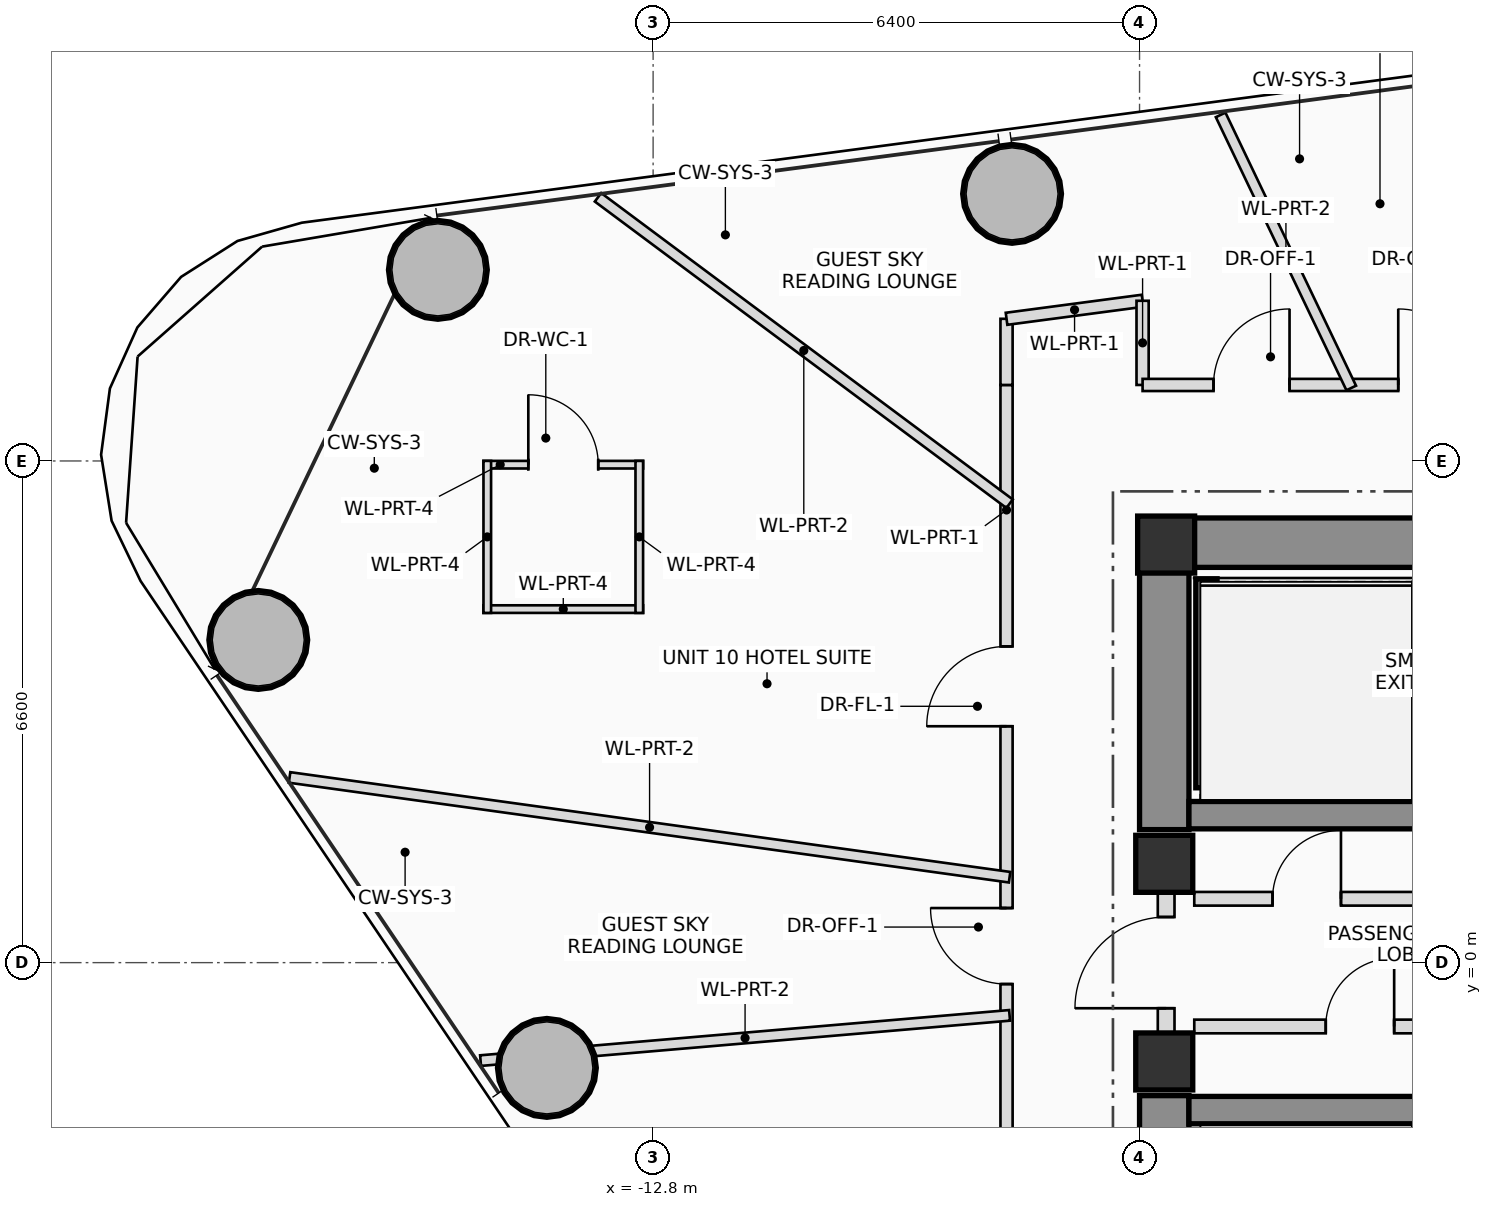
"""IFC4 building model, lengths in metres.
Left out: names, types, materials, properties, quantities, classifications, styles, units other than length and angle.
Written with IfcOpenShell. Run it as: python <this file> out.ifc"""

import sys

from ifc_helpers import new_model, si_unit, direction, frame, frame_2d, origin, origin_2d, place, context, subcontext, project, spatial, rectangle, hollow_circle, extrude, source, transform, mapped, element, fill, save


model = new_model("IFC4")
c1 = context("Model", 3, precision=1e-05, world=origin(), true_north=direction((0.0, 1.0)))
c2 = subcontext(c1, "Body", "Model", "MODEL_VIEW")
j1 = project(units=[si_unit("LENGTHUNIT", "METRE"), si_unit("PLANEANGLEUNIT", "RADIAN")], contexts=[c1])
p1 = place(None, origin())
s1 = spatial("IfcSite", under=j1, at=p1, CompositionType="ELEMENT")
p2 = place(p1, origin())
s2 = spatial("IfcBuilding", under=s1, at=p2, CompositionType="ELEMENT")
p3 = place(p2, frame((0.0, 0.0, 182.9)))
s3 = spatial("IfcBuildingStorey", under=s2, at=p3, CompositionType="ELEMENT", Elevation=182.9)
m1 = source(origin(), c2, "Body", "SweptSolid", [
    extrude(rectangle(XDim=0.75, YDim=0.75, at=origin_2d()), origin(), (0.0, 0.0, 1.0), 3.45),
])
p4 = place(p3, frame((-6.05, 5.5, 0.0), z_axis=(0.0, 0.0, 1.0), x_axis=(1.0, 0.0, 0.0)))
e1 = element("IfcColumn", 1, at=p4, inside=s3, PredefinedType="COLUMN", context=c2, shape_type="MappedRepresentation", body=[
    mapped(m1, transform((0.0, 0.0, 0.0), scale=1.0)),
])
p5 = place(p3, frame((-6.4, 5.525, 0.0), z_axis=(0.0, 0.0, 1.0), x_axis=(1.0, 0.0, 0.0)))
e2 = element("IfcWall", 2, at=p5, inside=s3, PredefinedType="SHEAR", context=c2, shape_type="SweptSolid", body=[
    extrude(rectangle(XDim=12.8, YDim=0.65, at=frame_2d((6.4, 0.0))), origin(), (0.0, 0.0, 1.0), 3.45),
])
p6 = place(p5, frame((8.6, 0.0, 0.0)))
e3 = element("IfcOpeningElement", 3, at=p6, cuts=e2, PredefinedType="OPENING", context=c2, shape_type="SweptSolid", body=[
    extrude(rectangle(XDim=1.2, YDim=2.2, at=frame_2d((0.6, 1.1))), frame((0.0, 0.335, 0.0), z_axis=(0.0, -1.0, 0.0), x_axis=(1.0, 0.0, 0.0)), (0.0, 0.0, 1.0), 0.67),
])
for number, where, z_axis, x_axis in (
    (4, (-6.075, -5.2, 0.0), (0.0, 0.0, 1.0), (0.0, 1.0, 0.0)),
    (5, (-6.075, 1.75, 0.0), (0.0, 0.0, 1.0), (0.0, 1.0, 0.0)),
):
    element("IfcWall", number, at=place(p3, frame(where, z_axis=z_axis, x_axis=x_axis)), inside=s3, PredefinedType="SHEAR", context=c2, shape_type="SweptSolid", body=[
        extrude(rectangle(XDim=3.45, YDim=0.65, at=frame_2d((1.725, 0.0))), origin(), (0.0, 0.0, 1.0), 3.45),
    ])
for number, where, z_axis, x_axis in (
    (6, (-5.75, 1.94, 0.0), (0.0, 0.0, 1.0), (1.0, 0.0, 0.0)),
    (7, (-5.75, -1.94, 0.0), (0.0, 0.0, 1.0), (1.0, 0.0, 0.0)),
):
    element("IfcWall", number, at=place(p3, frame(where, z_axis=z_axis, x_axis=x_axis)), inside=s3, PredefinedType="SHEAR", context=c2, shape_type="SweptSolid", body=[
        extrude(rectangle(XDim=11.5, YDim=0.36, at=frame_2d((5.75, 0.0))), origin(), (0.0, 0.0, 1.0), 3.45),
    ])
p7 = place(p3, frame((-5.52, 2.3, 0.0), z_axis=(0.0, 0.0, 1.0), x_axis=(0.0, 1.0, 0.0)))
e8 = element("IfcWall", 8, at=p7, inside=s3, PredefinedType="SHEAR", context=c2, shape_type="SweptSolid", body=[
    extrude(rectangle(XDim=2.75, YDim=0.28, at=frame_2d((1.375, 0.0))), origin(), (0.0, 0.0, 1.0), 3.45),
])
for number, where, z_axis, x_axis in (
    (9, (-6.075, -1.3, 0.0), (0.0, 0.0, 1.0), (1.0, 0.0, 0.0)),
    (10, (-6.075, 1.3, 0.0), (0.0, 0.0, 1.0), (1.0, 0.0, 0.0)),
):
    element("IfcColumn", number, at=place(p3, frame(where, z_axis=z_axis, x_axis=x_axis)), inside=s3, PredefinedType="COLUMN", context=c2, shape_type="MappedRepresentation", body=[
        mapped(m1, transform((0.0, 0.0, 0.0), scale=1.0)),
    ])
m2 = source(origin(), c2, "Body", "SweptSolid", [
    extrude(hollow_circle(Radius=0.65, WallThickness=0.045, at=origin_2d()), origin(), (0.0, 0.0, 1.0), 3.45),
])
for number, where, z_axis, x_axis in (
    (11, (-8.077, 10.114, 0.0), (0.0, 0.0, 1.0), (1.0, 0.0, 0.0)),
    (12, (-15.632, 9.114, 0.0), (0.0, 0.0, 1.0), (1.0, 0.0, 0.0)),
    (13, (-17.995, 4.245, 0.0), (0.0, 0.0, 1.0), (1.0, 0.0, 0.0)),
    (14, (-14.198, -1.385, 0.0), (0.0, 0.0, 1.0), (1.0, 0.0, 0.0)),
):
    element("IfcColumn", number, at=place(p3, frame(where, z_axis=z_axis, x_axis=x_axis)), inside=s3, PredefinedType="COLUMN", context=c2, shape_type="MappedRepresentation", body=[
        mapped(m2, transform((0.0, 0.0, 0.0), scale=1.0)),
    ])
p8 = place(p3, frame((-6.05, -0.95, 0.0), z_axis=(0.0, 0.0, 1.0), x_axis=(0.0, 1.0, 0.0)))
e15 = element("IfcWall", 15, at=p8, inside=s3, PredefinedType="PLUMBINGWALL", context=c2, shape_type="SweptSolid", body=[
    extrude(rectangle(XDim=1.9, YDim=0.22, at=frame_2d((0.95, 0.0))), origin(), (0.0, 0.0, 1.0), 2.19),
])
p9 = place(p8, frame((0.35, 0.0, 0.0)))
e16 = element("IfcOpeningElement", 16, at=p9, cuts=e15, PredefinedType="OPENING", context=c2, shape_type="SweptSolid", body=[
    extrude(rectangle(XDim=1.2, YDim=2.2, at=frame_2d((0.6, 1.1))), frame((0.0, 0.12, 0.0), z_axis=(0.0, -1.0, 0.0), x_axis=(1.0, 0.0, 0.0)), (0.0, 0.0, 1.0), 0.24),
])
p10 = place(p3, frame((-5.68, 0.84, 0.0), z_axis=(0.0, 0.0, 1.0), x_axis=(1.0, 0.0, 0.0)))
e17 = element("IfcWall", 17, at=p10, inside=s3, PredefinedType="PLUMBINGWALL", context=c2, shape_type="SweptSolid", body=[
    extrude(rectangle(XDim=11.33, YDim=0.18, at=frame_2d((5.665, 0.0))), origin(), (0.0, 0.0, 1.0), 3.21),
])
p11 = place(p10, frame((1.03, 0.0, 0.0)))
e18 = element("IfcOpeningElement", 18, at=p11, cuts=e17, PredefinedType="OPENING", context=c2, shape_type="SweptSolid", body=[
    extrude(rectangle(XDim=0.9, YDim=2.05, at=frame_2d((0.45, 1.025))), frame((0.0, 0.1, 0.0), z_axis=(0.0, -1.0, 0.0), x_axis=(1.0, 0.0, 0.0)), (0.0, 0.0, 1.0), 0.2),
])
p12 = place(p10, frame((3.93, 0.0, 0.0)))
e19 = element("IfcOpeningElement", 19, at=p12, cuts=e17, PredefinedType="OPENING", context=c2, shape_type="SweptSolid", body=[
    extrude(rectangle(XDim=1.1, YDim=2.2, at=frame_2d((0.55, 1.1))), frame((0.0, 0.1, 0.0), z_axis=(0.0, -1.0, 0.0), x_axis=(1.0, 0.0, 0.0)), (0.0, 0.0, 1.0), 0.2),
])
p13 = place(p10, frame((5.63, 0.0, 0.0)))
e20 = element("IfcOpeningElement", 20, at=p13, cuts=e17, PredefinedType="OPENING", context=c2, shape_type="SweptSolid", body=[
    extrude(rectangle(XDim=1.1, YDim=2.2, at=frame_2d((0.55, 1.1))), frame((0.0, 0.1, 0.0), z_axis=(0.0, -1.0, 0.0), x_axis=(1.0, 0.0, 0.0)), (0.0, 0.0, 1.0), 0.2),
])
p14 = place(p10, frame((10.25, 0.0, 0.0)))
e21 = element("IfcOpeningElement", 21, at=p14, cuts=e17, PredefinedType="OPENING", context=c2, shape_type="SweptSolid", body=[
    extrude(rectangle(XDim=0.9, YDim=2.05, at=frame_2d((0.45, 1.025))), frame((0.0, 0.1, 0.0), z_axis=(0.0, -1.0, 0.0), x_axis=(1.0, 0.0, 0.0)), (0.0, 0.0, 1.0), 0.2),
])
p15 = place(p3, frame((-5.68, -0.84, 0.0), z_axis=(0.0, 0.0, 1.0), x_axis=(1.0, 0.0, 0.0)))
e22 = element("IfcWall", 22, at=p15, inside=s3, PredefinedType="PLUMBINGWALL", context=c2, shape_type="SweptSolid", body=[
    extrude(rectangle(XDim=11.33, YDim=0.18, at=frame_2d((5.665, 0.0))), origin(), (0.0, 0.0, 1.0), 3.21),
])
p16 = place(p15, frame((1.73, 0.0, 0.0)))
e23 = element("IfcOpeningElement", 23, at=p16, cuts=e22, PredefinedType="OPENING", context=c2, shape_type="SweptSolid", body=[
    extrude(rectangle(XDim=0.9, YDim=2.05, at=frame_2d((0.45, 1.025))), frame((0.0, 0.1, 0.0), z_axis=(0.0, -1.0, 0.0), x_axis=(1.0, 0.0, 0.0)), (0.0, 0.0, 1.0), 0.2),
])
p17 = place(p15, frame((3.93, 0.0, 0.0)))
e24 = element("IfcOpeningElement", 24, at=p17, cuts=e22, PredefinedType="OPENING", context=c2, shape_type="SweptSolid", body=[
    extrude(rectangle(XDim=1.1, YDim=2.2, at=frame_2d((0.55, 1.1))), frame((0.0, 0.1, 0.0), z_axis=(0.0, -1.0, 0.0), x_axis=(1.0, 0.0, 0.0)), (0.0, 0.0, 1.0), 0.2),
])
p18 = place(p15, frame((5.63, 0.0, 0.0)))
e25 = element("IfcOpeningElement", 25, at=p18, cuts=e22, PredefinedType="OPENING", context=c2, shape_type="SweptSolid", body=[
    extrude(rectangle(XDim=1.1, YDim=2.2, at=frame_2d((0.55, 1.1))), frame((0.0, 0.1, 0.0), z_axis=(0.0, -1.0, 0.0), x_axis=(1.0, 0.0, 0.0)), (0.0, 0.0, 1.0), 0.2),
])
p19 = place(p15, frame((9.58, 0.0, 0.0)))
e26 = element("IfcOpeningElement", 26, at=p19, cuts=e22, PredefinedType="OPENING", context=c2, shape_type="SweptSolid", body=[
    extrude(rectangle(XDim=0.9, YDim=2.05, at=frame_2d((0.45, 1.025))), frame((0.0, 0.1, 0.0), z_axis=(0.0, -1.0, 0.0), x_axis=(1.0, 0.0, 0.0)), (0.0, 0.0, 1.0), 0.2),
])
p20 = place(p3, frame((-15.032, 6.551, 0.0), z_axis=(0.0, 0.0, 1.0), x_axis=(1.0, 0.0, 0.0)))
e27 = element("IfcWall", 27, at=p20, inside=s3, PredefinedType="PARTITIONING", context=c2, shape_type="SweptSolid", body=[
    extrude(rectangle(XDim=2.1, YDim=0.1, at=frame_2d((1.05, 0.0))), origin(), (0.0, 0.0, 1.0), 2.865),
])
p21 = place(p20, frame((0.59, 0.0, 0.0)))
e28 = element("IfcOpeningElement", 28, at=p21, cuts=e27, PredefinedType="OPENING", context=c2, shape_type="SweptSolid", body=[
    extrude(rectangle(XDim=0.92, YDim=2.1, at=frame_2d((0.46, 1.05))), frame((0.0, 0.06, 0.0), z_axis=(0.0, -1.0, 0.0), x_axis=(1.0, 0.0, 0.0)), (0.0, 0.0, 1.0), 0.12),
])
p22 = place(p3, frame((-12.932, 4.651, 0.0), z_axis=(0.0, 0.0, 1.0), x_axis=(-1.0, 0.0, 0.0)))
e29 = element("IfcWall", 29, at=p22, inside=s3, PredefinedType="PARTITIONING", context=c2, shape_type="SweptSolid", body=[
    extrude(rectangle(XDim=2.1, YDim=0.1, at=frame_2d((1.05, 0.0))), origin(), (0.0, 0.0, 1.0), 2.565),
])
for number, where, z_axis, x_axis in (
    (30, (-12.982, 6.601, 0.0), (0.0, 0.0, 1.0), (0.0, -1.0, 0.0)),
    (31, (-14.982, 4.601, 0.0), (0.0, 0.0, 1.0), (0.0, 1.0, 0.0)),
):
    element("IfcWall", number, at=place(p3, frame(where, z_axis=z_axis, x_axis=x_axis)), inside=s3, PredefinedType="PARTITIONING", context=c2, shape_type="SweptSolid", body=[
        extrude(rectangle(XDim=2.0, YDim=0.1, at=frame_2d((1.0, 0.0))), origin(), (0.0, 0.0, 1.0), 2.565),
    ])
p23 = place(p3, frame((-8.15, -7.454, 0.0), z_axis=(0.0, 0.0, 1.0), x_axis=(0.0, 1.0, 0.0)))
e32 = element("IfcWall", 32, at=p23, inside=s3, PredefinedType="PARTITIONING", context=c2, shape_type="SweptSolid", body=[
    extrude(rectangle(XDim=15.054, YDim=0.16, at=frame_2d((7.527, 0.0))), origin(), (0.0, 0.0, 1.0), 2.565),
])
p24 = place(p23, frame((3.019, 0.0, 0.0)))
e33 = element("IfcOpeningElement", 33, at=p24, cuts=e32, PredefinedType="OPENING", context=c2, shape_type="SweptSolid", body=[
    extrude(rectangle(XDim=0.9, YDim=2.05, at=frame_2d((0.45, 1.025))), frame((0.0, 0.09, 0.0), z_axis=(0.0, -1.0, 0.0), x_axis=(1.0, 0.0, 0.0)), (0.0, 0.0, 1.0), 0.18),
])
p25 = place(p23, frame((7.172, 0.0, 0.0)))
e34 = element("IfcOpeningElement", 34, at=p25, cuts=e32, PredefinedType="OPENING", context=c2, shape_type="SweptSolid", body=[
    extrude(rectangle(XDim=1.0, YDim=2.25, at=frame_2d((0.5, 1.125))), frame((0.0, 0.09, 0.0), z_axis=(0.0, -1.0, 0.0), x_axis=(1.0, 0.0, 0.0)), (0.0, 0.0, 1.0), 0.18),
])
p26 = place(p23, frame((10.563, 0.0, 0.0)))
e35 = element("IfcOpeningElement", 35, at=p26, cuts=e32, PredefinedType="OPENING", context=c2, shape_type="SweptSolid", body=[
    extrude(rectangle(XDim=1.05, YDim=2.2, at=frame_2d((0.525, 1.1))), frame((0.0, 0.09, 0.0), z_axis=(0.0, -1.0, 0.0), x_axis=(1.0, 0.0, 0.0)), (0.0, 0.0, 1.0), 0.18),
])
p27 = place(p3, frame((-8.15, 7.6, 0.0), z_axis=(0.0, 0.0, 1.0), x_axis=(0.0, 1.0, 0.0)))
e36 = element("IfcWall", 36, at=p27, inside=s3, PredefinedType="PARTITIONING", context=c2, shape_type="SweptSolid", body=[
    extrude(rectangle(XDim=0.87, YDim=0.16, at=frame_2d((0.435, 0.0))), origin(), (0.0, 0.0, 1.0), 2.765),
])
p28 = place(p3, frame((-8.15, 8.47, 0.0), z_axis=(0.0, 0.0, 1.0), x_axis=(0.991342086618, 0.131304483168, 0.0)))
e37 = element("IfcWall", 37, at=p28, inside=s3, PredefinedType="PARTITIONING", context=c2, shape_type="SweptSolid", body=[
    extrude(rectangle(XDim=1.805, YDim=0.16, at=frame_2d((0.903, 0.0))), origin(), (0.0, 0.0, 1.0), 2.565),
])
p29 = place(p3, frame((-6.36, 8.708, 0.0), z_axis=(0.0, 0.0, 1.0), x_axis=(0.0, -1.0, 0.0)))
e38 = element("IfcWall", 38, at=p29, inside=s3, PredefinedType="PARTITIONING", context=c2, shape_type="SweptSolid", body=[
    extrude(rectangle(XDim=1.107, YDim=0.16, at=frame_2d((0.554, 0.0))), origin(), (0.0, 0.0, 1.0), 2.765),
])
p30 = place(p3, frame((-6.36, 7.6, 0.0), z_axis=(0.0, 0.0, 1.0), x_axis=(1.0, 0.0, 0.0)))
e39 = element("IfcWall", 39, at=p30, inside=s3, PredefinedType="PARTITIONING", context=c2, shape_type="SweptSolid", body=[
    extrude(rectangle(XDim=11.61, YDim=0.16, at=frame_2d((5.805, 0.0))), origin(), (0.0, 0.0, 1.0), 2.565),
])
p31 = place(p30, frame((0.934, 0.0, 0.0)))
e40 = element("IfcOpeningElement", 40, at=p31, cuts=e39, PredefinedType="OPENING", context=c2, shape_type="SweptSolid", body=[
    extrude(rectangle(XDim=1.0, YDim=2.25, at=frame_2d((0.5, 1.125))), frame((0.0, 0.09, 0.0), z_axis=(0.0, -1.0, 0.0), x_axis=(1.0, 0.0, 0.0)), (0.0, 0.0, 1.0), 0.18),
])
p32 = place(p30, frame((3.364, 0.0, 0.0)))
e41 = element("IfcOpeningElement", 41, at=p32, cuts=e39, PredefinedType="OPENING", context=c2, shape_type="SweptSolid", body=[
    extrude(rectangle(XDim=1.0, YDim=2.25, at=frame_2d((0.5, 1.125))), frame((0.0, 0.09, 0.0), z_axis=(0.0, -1.0, 0.0), x_axis=(1.0, 0.0, 0.0)), (0.0, 0.0, 1.0), 0.18),
])
p33 = place(p30, frame((6.826, 0.0, 0.0)))
e42 = element("IfcOpeningElement", 42, at=p33, cuts=e39, PredefinedType="OPENING", context=c2, shape_type="SweptSolid", body=[
    extrude(rectangle(XDim=1.0, YDim=2.25, at=frame_2d((0.5, 1.125))), frame((0.0, 0.09, 0.0), z_axis=(0.0, -1.0, 0.0), x_axis=(1.0, 0.0, 0.0)), (0.0, 0.0, 1.0), 0.18),
])
p34 = place(p30, frame((10.285, 0.0, 0.0)))
e43 = element("IfcOpeningElement", 43, at=p34, cuts=e39, PredefinedType="OPENING", context=c2, shape_type="SweptSolid", body=[
    extrude(rectangle(XDim=1.0, YDim=2.25, at=frame_2d((0.5, 1.125))), frame((0.0, 0.09, 0.0), z_axis=(0.0, -1.0, 0.0), x_axis=(1.0, 0.0, 0.0)), (0.0, 0.0, 1.0), 0.18),
])
p35 = place(p3, frame((-3.615, 7.56, 0.0), z_axis=(0.0, 0.0, 1.0), x_axis=(-0.431353551372, 0.902182971308, 0.0)))
e44 = element("IfcWall", 44, at=p35, inside=s3, PredefinedType="PARTITIONING", context=c2, shape_type="SweptSolid", body=[
    extrude(rectangle(XDim=3.983, YDim=0.14, at=frame_2d((1.991, 0.0))), origin(), (0.0, 0.0, 1.0), 2.565),
])
p36 = place(p3, frame((-8.11, 6.038, 0.0), z_axis=(0.0, 0.0, 1.0), x_axis=(-0.802099870975, 0.597189917012, 0.0)))
e45 = element("IfcWall", 45, at=p36, inside=s3, PredefinedType="PARTITIONING", context=c2, shape_type="SweptSolid", body=[
    extrude(rectangle(XDim=6.751, YDim=0.14, at=frame_2d((3.375, 0.0))), origin(), (0.0, 0.0, 1.0), 2.565),
])
p37 = place(p3, frame((-8.11, 1.124, 0.0), z_axis=(0.0, 0.0, 1.0), x_axis=(-0.990537537155, 0.137242076229, 0.0)))
e46 = element("IfcWall", 46, at=p37, inside=s3, PredefinedType="PARTITIONING", context=c2, shape_type="SweptSolid", body=[
    extrude(rectangle(XDim=9.563, YDim=0.14, at=frame_2d((4.782, 0.0))), origin(), (0.0, 0.0, 1.0), 2.725),
])
p38 = place(p3, frame((-8.11, -0.694, 0.0), z_axis=(0.0, 0.0, 1.0), x_axis=(-0.996360400447, -0.085240556199, 0.0)))
e47 = element("IfcWall", 47, at=p38, inside=s3, PredefinedType="PARTITIONING", context=c2, shape_type="SweptSolid", body=[
    extrude(rectangle(XDim=6.986, YDim=0.14, at=frame_2d((3.493, 0.0))), origin(), (0.0, 0.0, 1.0), 2.765),
])
p39 = place(p9, origin())
e48 = element("IfcDoor", 48, at=p39, inside=s3, OperationType="SINGLE_SWING_LEFT", PredefinedType="DOOR", context=c2, shape_type="SweptSolid", body=[
    extrude(rectangle(XDim=1.2, YDim=2.2, at=frame_2d((0.6, 1.1))), frame((0.0, 0.025, 0.0), z_axis=(0.0, -1.0, 0.0), x_axis=(1.0, 0.0, 0.0)), (0.0, 0.0, 1.0), 0.05),
])
fill(e16, e48)
p40 = place(p11, origin())
e49 = element("IfcDoor", 49, at=p40, inside=s3, OperationType="SINGLE_SWING_RIGHT", PredefinedType="DOOR", context=c2, shape_type="SweptSolid", body=[
    extrude(rectangle(XDim=0.9, YDim=2.05, at=frame_2d((0.45, 1.025))), frame((0.0, 0.025, 0.0), z_axis=(0.0, -1.0, 0.0), x_axis=(1.0, 0.0, 0.0)), (0.0, 0.0, 1.0), 0.05),
])
fill(e18, e49)
p41 = place(p16, origin())
e50 = element("IfcDoor", 50, at=p41, inside=s3, OperationType="SINGLE_SWING_RIGHT", PredefinedType="DOOR", context=c2, shape_type="SweptSolid", body=[
    extrude(rectangle(XDim=0.9, YDim=2.05, at=frame_2d((0.45, 1.025))), frame((0.0, 0.025, 0.0), z_axis=(0.0, -1.0, 0.0), x_axis=(1.0, 0.0, 0.0)), (0.0, 0.0, 1.0), 0.05),
])
fill(e23, e50)
p42 = place(p21, origin())
e51 = element("IfcDoor", 51, at=p42, inside=s3, OperationType="SINGLE_SWING_LEFT", PredefinedType="DOOR", context=c2, shape_type="SweptSolid", body=[
    extrude(rectangle(XDim=0.92, YDim=2.1, at=frame_2d((0.46, 1.05))), frame((0.0, 0.025, 0.0), z_axis=(0.0, -1.0, 0.0), x_axis=(1.0, 0.0, 0.0)), (0.0, 0.0, 1.0), 0.05),
])
fill(e28, e51)
p43 = place(p25, origin())
e52 = element("IfcDoor", 52, at=p43, inside=s3, OperationType="SINGLE_SWING_RIGHT", PredefinedType="DOOR", context=c2, shape_type="SweptSolid", body=[
    extrude(rectangle(XDim=1.0, YDim=2.25, at=frame_2d((0.5, 1.125))), frame((0.0, 0.025, 0.0), z_axis=(0.0, -1.0, 0.0), x_axis=(1.0, 0.0, 0.0)), (0.0, 0.0, 1.0), 0.05),
])
fill(e34, e52)
p44 = place(p26, origin())
e53 = element("IfcDoor", 53, at=p44, inside=s3, OperationType="SINGLE_SWING_LEFT", PredefinedType="DOOR", context=c2, shape_type="SweptSolid", body=[
    extrude(rectangle(XDim=1.05, YDim=2.2, at=frame_2d((0.525, 1.1))), frame((0.0, 0.025, 0.0), z_axis=(0.0, -1.0, 0.0), x_axis=(1.0, 0.0, 0.0)), (0.0, 0.0, 1.0), 0.05),
])
fill(e35, e53)
p45 = place(p31, origin())
e54 = element("IfcDoor", 54, at=p45, inside=s3, OperationType="SINGLE_SWING_RIGHT", PredefinedType="DOOR", context=c2, shape_type="SweptSolid", body=[
    extrude(rectangle(XDim=1.0, YDim=2.25, at=frame_2d((0.5, 1.125))), frame((0.0, 0.025, 0.0), z_axis=(0.0, -1.0, 0.0), x_axis=(1.0, 0.0, 0.0)), (0.0, 0.0, 1.0), 0.05),
])
fill(e40, e54)
p46 = place(p32, origin())
e55 = element("IfcDoor", 55, at=p46, inside=s3, OperationType="SINGLE_SWING_LEFT", PredefinedType="DOOR", context=c2, shape_type="SweptSolid", body=[
    extrude(rectangle(XDim=1.0, YDim=2.25, at=frame_2d((0.5, 1.125))), frame((0.0, 0.025, 0.0), z_axis=(0.0, -1.0, 0.0), x_axis=(1.0, 0.0, 0.0)), (0.0, 0.0, 1.0), 0.05),
])
fill(e41, e55)
save(model, sys.argv[1])
